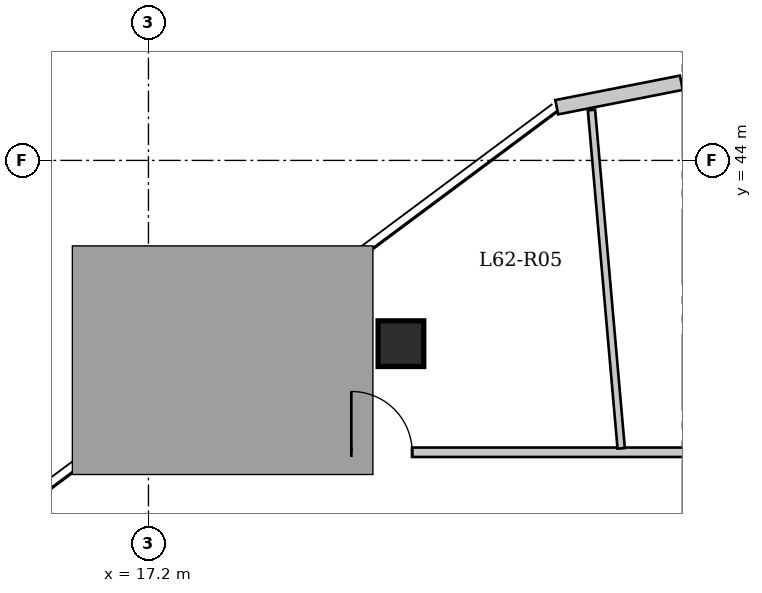
"""IFC4 building model, lengths in metres.
Left out: names, types, materials, properties, quantities, classifications, styles, units other than length and angle.
Written with IfcOpenShell. Run it as: python <this file> out.ifc"""

import sys

from ifc_helpers import new_model, si_unit, direction, frame, frame_2d, origin, origin_2d, place, context, subcontext, project, spatial, rectangle, hollow_rectangle, extrude, source, transform, mapped, element, fill, save


model = new_model("IFC4")
c1 = context("Model", 3, precision=1e-05, world=origin(), true_north=direction((0.0, 1.0)))
c2 = subcontext(c1, "Body", "Model", "MODEL_VIEW")
j1 = project(units=[si_unit("LENGTHUNIT", "METRE"), si_unit("PLANEANGLEUNIT", "RADIAN")], contexts=[c1])
p1 = place(None, origin())
s1 = spatial("IfcSite", under=j1, at=p1, CompositionType="ELEMENT")
p2 = place(p1, origin())
s2 = spatial("IfcBuilding", under=s1, at=p2, CompositionType="ELEMENT")
p3 = place(p2, frame((0.0, 0.0, 236.2)))
s3 = spatial("IfcBuildingStorey", under=s2, at=p3, CompositionType="ELEMENT", Elevation=236.2)
p4 = place(p3, frame((21.352, 40.986, 0.0), z_axis=(0.0, 0.0, 1.0), x_axis=(1.0, 0.0, 0.0)))
e1 = element("IfcColumn", 1, at=p4, inside=s3, PredefinedType="COLUMN", context=c2, shape_type="SweptSolid", body=[
    extrude(hollow_rectangle(XDim=0.75, YDim=0.75, WallThickness=0.04, at=origin_2d()), origin(), (0.0, 0.0, 1.0), 4.15),
])
p5 = place(p3, frame((23.914, 44.875, 0.0), z_axis=(0.0, 0.0, 1.0), x_axis=(0.981222754969, 0.192877953979, 0.0)))
e2 = element("IfcWall", 2, at=p5, inside=s3, PredefinedType="SOLIDWALL", context=c2, shape_type="SweptSolid", body=[
    extrude(rectangle(XDim=2.089, YDim=0.24, at=frame_2d((1.044, 0.0))), origin(), (0.0, 0.0, 1.0), 4.15),
])
p6 = place(p3, frame((16.312, 39.2, 0.0), z_axis=(0.0, 0.0, 1.0), x_axis=(1.0, 0.0, 0.0)))
e3 = element("IfcWall", 3, at=p6, inside=s3, PredefinedType="PARTITIONING", context=c2, shape_type="SweptSolid", body=[
    extrude(rectangle(XDim=18.708, YDim=0.155, at=frame_2d((9.354, 0.0))), origin(), (0.0, 0.0, 1.0), 4.15),
])
p7 = place(p6, frame((13.116, 0.0, 0.0)))
e4 = element("IfcOpeningElement", 4, at=p7, cuts=e3, PredefinedType="OPENING", context=c2, shape_type="SweptSolid", body=[
    extrude(rectangle(XDim=1.0, YDim=2.15, at=frame_2d((0.5, 1.075))), frame((0.0, 0.087, 0.0), z_axis=(0.0, -1.0, 0.0), x_axis=(1.0, 0.0, 0.0)), (0.0, 0.0, 1.0), 0.175),
])
p8 = place(p6, frame((4.225, 0.0, 0.0)))
e5 = element("IfcOpeningElement", 5, at=p8, cuts=e3, PredefinedType="OPENING", context=c2, shape_type="SweptSolid", body=[
    extrude(rectangle(XDim=1.0, YDim=2.15, at=frame_2d((0.5, 1.075))), frame((0.0, 0.087, 0.0), z_axis=(0.0, -1.0, 0.0), x_axis=(1.0, 0.0, 0.0)), (0.0, 0.0, 1.0), 0.175),
])
p9 = place(p3, frame((24.974, 39.265, 0.0), z_axis=(0.0, 0.0, 1.0), x_axis=(-0.087504740228, 0.996164103167, 0.0)))
e6 = element("IfcWall", 6, at=p9, inside=s3, PredefinedType="PARTITIONING", context=c2, shape_type="SweptSolid", body=[
    extrude(rectangle(XDim=5.586, YDim=0.12, at=frame_2d((2.793, 0.0))), origin(), (0.0, 0.0, 1.0), 4.15),
])
m1 = source(origin(), c2, "Body", "SweptSolid", [
    extrude(rectangle(XDim=1.0, YDim=2.15, at=frame_2d((0.5, 1.075))), frame((0.0, 0.025, 0.0), z_axis=(0.0, -1.0, 0.0), x_axis=(1.0, 0.0, 0.0)), (0.0, 0.0, 1.0), 0.05),
])
p10 = place(p8, origin())
e7 = element("IfcDoor", 7, at=p10, inside=s3, OperationType="SINGLE_SWING_LEFT", PredefinedType="DOOR", context=c2, shape_type="MappedRepresentation", body=[
    mapped(m1, transform((0.0, 0.0, 0.0), x_axis=(1.0, 0.0, 0.0), y_axis=(0.0, 1.0, 0.0), z_axis=(0.0, 0.0, 1.0), scale=1.0)),
])
fill(e5, e7)
save(model, sys.argv[1])
